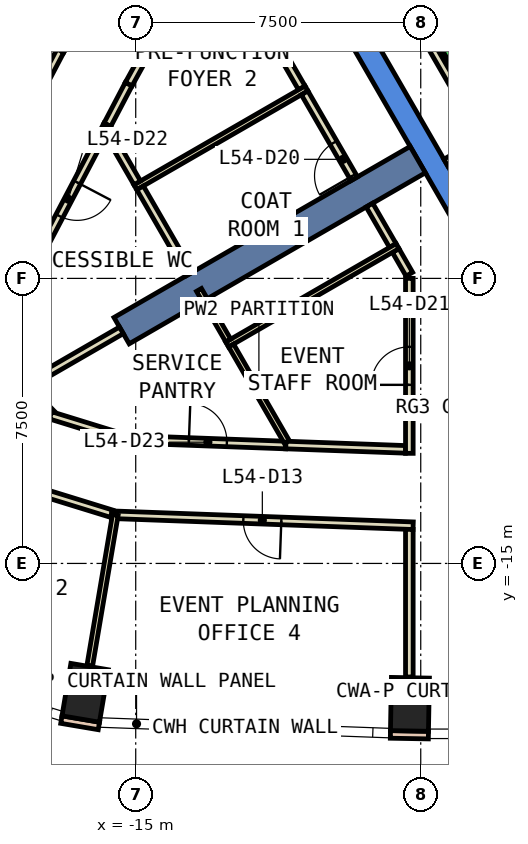
"""IFC4 building model, lengths in metres.
Left out: names, types, materials, properties, quantities, classifications, styles, units other than length and angle.
Written with IfcOpenShell. Run it as: python <this file> out.ifc"""

import sys

from ifc_helpers import new_model, si_unit, direction, frame, frame_2d, origin, origin_2d, place, context, subcontext, project, spatial, polyline, rectangle, outline, extrude, element, fill, save


model = new_model("IFC4")
c1 = context("Model", 3, precision=1e-05, world=origin(), true_north=direction((0.0, 1.0)))
c2 = subcontext(c1, "Body", "Model", "MODEL_VIEW")
j1 = project(units=[si_unit("LENGTHUNIT", "METRE"), si_unit("PLANEANGLEUNIT", "RADIAN")], contexts=[c1])
p1 = place(None, origin())
s1 = spatial("IfcSite", under=j1, at=p1, CompositionType="ELEMENT")
p2 = place(p1, origin())
s2 = spatial("IfcBuilding", under=s1, at=p2, CompositionType="ELEMENT")
p3 = place(p2, frame((0.0, 0.0, 241.4)))
s3 = spatial("IfcBuildingStorey", under=s2, at=p3, CompositionType="ELEMENT", Elevation=241.4)
for number, where, z_axis, x_axis in (
    (1, (-16.33, -18.404, 0.0), (0.0, 0.0, 1.0), (-0.986, 0.167, 0.0)),
    (2, (-7.784, -18.708, 0.0), (0.0, 0.0, 1.0), (-1.0, 0.018, 0.0)),
):
    element("IfcColumn", number, at=place(p3, frame(where, z_axis=z_axis, x_axis=x_axis)), inside=s3, PredefinedType="COLUMN", context=c2, shape_type="SweptSolid", body=[
        extrude(rectangle(XDim=1.0, YDim=1.4, at=origin_2d()), origin(), (0.0, 0.0, 1.0), 3.26),
    ])
p4 = place(p3, frame((0.0, 0.0, -0.6)))
e3 = element("IfcWall", 3, at=p4, inside=s3, PredefinedType="SHEAR", context=c2, shape_type="SweptSolid", body=[
    extrude(outline(polyline([(-11.547, 2.5), (-5.774, -7.5), (-5.427, -6.9), (-10.854, 2.5), (-11.547, 2.5)])), origin(), (0.0, 0.0, 1.0), 3.86),
])
p5 = place(p3, frame((-7.578, -4.375, -0.6), z_axis=(0.0, 0.0, 1.0), x_axis=(-0.866024315419, -0.5000018851, 0.0)))
e4 = element("IfcWall", 4, at=p5, inside=s3, PredefinedType="SHEAR", context=c2, shape_type="SweptSolid", body=[
    extrude(rectangle(XDim=9.0, YDim=0.8, at=frame_2d((4.5, 0.0))), origin(), (0.0, 0.0, 1.0), 3.86),
])
for number, where, z_axis, x_axis in (
    (5, (-16.956, -19.109, 0.0), (0.0, 0.0, 1.0), (0.986, -0.167, 0.0)),
    (6, (-8.298, -19.499, 0.0), (0.0, 0.0, 1.0), (1.0, -0.018, 0.0)),
):
    element("IfcWall", number, at=place(p3, frame(where, z_axis=z_axis, x_axis=x_axis)), inside=s3, PredefinedType="STANDARD", context=c2, shape_type="SweptSolid", body=[
        extrude(rectangle(XDim=1.0, YDim=0.2, at=frame_2d((0.5, 0.0))), origin(), (0.0, 0.0, 1.0), 3.26),
    ])
p6 = place(p3, frame((-10.63, -2.488, 0.0), z_axis=(0.0, 0.0, 1.0), x_axis=(-0.500108649621, 0.865962665808, 0.0)))
e7 = element("IfcWall", 7, at=p6, inside=s3, PredefinedType="PARTITIONING", context=c2, shape_type="SweptSolid", body=[
    extrude(rectangle(XDim=4.815, YDim=0.2, at=frame_2d((2.408, 0.0))), origin(), (0.0, 0.0, 1.0), 3.26),
])
p7 = place(p6, frame((1.908, 0.0, 0.0)))
e8 = element("IfcOpeningElement", 8, at=p7, cuts=e7, PredefinedType="OPENING", context=c2, shape_type="SweptSolid", body=[
    extrude(rectangle(XDim=1.0, YDim=2.1, at=frame_2d((0.5, 1.05))), frame((0.0, 0.11, 0.0), z_axis=(0.0, -1.0, 0.0), x_axis=(1.0, 0.0, 0.0)), (0.0, 0.0, 1.0), 0.22),
])
p8 = place(p3, frame((-13.036, 1.508, 0.0), z_axis=(0.0, 0.0, 1.0), x_axis=(-0.482884552822, -0.87568402329, 0.0)))
e9 = element("IfcWall", 9, at=p8, inside=s3, PredefinedType="PARTITIONING", context=c2, shape_type="SweptSolid", body=[
    extrude(rectangle(XDim=4.453, YDim=0.2, at=frame_2d((2.226, 0.0))), origin(), (0.0, 0.0, 1.0), 3.26),
])
p9 = place(p3, frame((-15.186, -2.391, 0.0), z_axis=(0.0, 0.0, 1.0), x_axis=(-0.464794189951, -0.885418748948, 0.0)))
e10 = element("IfcWall", 10, at=p9, inside=s3, PredefinedType="PARTITIONING", context=c2, shape_type="SweptSolid", body=[
    extrude(rectangle(XDim=1.205, YDim=0.2, at=frame_2d((0.603, 0.0))), origin(), (0.0, 0.0, 1.0), 3.26),
])
p10 = place(p3, frame((-8.235, -6.636, 0.0), z_axis=(0.0, 0.0, 1.0), x_axis=(-0.500089055364, 0.86597398154, 0.0)))
e11 = element("IfcWall", 11, at=p10, inside=s3, PredefinedType="PARTITIONING", context=c2, shape_type="SweptSolid", body=[
    extrude(rectangle(XDim=1.23, YDim=0.2, at=frame_2d((0.615, 0.0))), origin(), (0.0, 0.0, 1.0), 3.26),
])
p11 = place(p3, frame((-7.8, -7.39, 0.0), z_axis=(0.0, 0.0, 1.0), x_axis=(-0.499712670472, 0.866191230024, 0.0)))
e12 = element("IfcWall", 12, at=p11, inside=s3, PredefinedType="PARTITIONING", context=c2, shape_type="SweptSolid", body=[
    extrude(rectangle(XDim=0.72, YDim=0.2, at=frame_2d((0.36, 0.0))), origin(), (0.0, 0.0, 1.0), 3.26),
])
p12 = place(p3, frame((-11.052, -11.884, 0.0), z_axis=(0.0, 0.0, 1.0), x_axis=(0.999335249241, -0.036456270033, 0.0)))
e13 = element("IfcWall", 13, at=p12, inside=s3, PredefinedType="PARTITIONING", context=c2, shape_type="SweptSolid", body=[
    extrude(rectangle(XDim=3.154, YDim=0.2, at=frame_2d((1.577, 0.0))), origin(), (0.0, 0.0, 1.0), 3.26),
])
p13 = place(p3, frame((-15.746, -3.458, 0.0), z_axis=(0.0, 0.0, 1.0), x_axis=(-0.465179971699, -0.885216128372, 0.0)))
e14 = element("IfcWall", 14, at=p13, inside=s3, PredefinedType="PARTITIONING", context=c2, shape_type="SweptSolid", body=[
    extrude(rectangle(XDim=4.424, YDim=0.2, at=frame_2d((2.212, 0.0))), origin(), (0.0, 0.0, 1.0), 3.26),
])
p14 = place(p13, frame((1.712, 0.0, 0.0)))
e15 = element("IfcOpeningElement", 15, at=p14, cuts=e14, PredefinedType="OPENING", context=c2, shape_type="SweptSolid", body=[
    extrude(rectangle(XDim=1.0, YDim=2.1, at=frame_2d((0.5, 1.05))), frame((0.0, 0.11, 0.0), z_axis=(0.0, -1.0, 0.0), x_axis=(1.0, 0.0, 0.0)), (0.0, 0.0, 1.0), 0.22),
])
p15 = place(p3, frame((-17.915, -10.344, 0.0), z_axis=(0.0, 0.0, 1.0), x_axis=(0.698527813511, -0.715582904877, 0.0)))
e16 = element("IfcWall", 16, at=p15, inside=s3, PredefinedType="PARTITIONING", context=c2, shape_type="SweptSolid", body=[
    extrude(rectangle(XDim=1.002, YDim=0.2, at=frame_2d((0.501, 0.0))), origin(), (0.0, 0.0, 1.0), 3.26),
])
p16 = place(p3, frame((-17.241, -11.103, 0.0), z_axis=(0.0, 0.0, 1.0), x_axis=(0.95563113363, -0.294566013716, 0.0)))
e17 = element("IfcWall", 17, at=p16, inside=s3, PredefinedType="PARTITIONING", context=c2, shape_type="SweptSolid", body=[
    extrude(rectangle(XDim=2.036, YDim=0.2, at=frame_2d((1.018, 0.0))), origin(), (0.0, 0.0, 1.0), 3.26),
])
p17 = place(p3, frame((-15.3, -11.729, 0.0), z_axis=(0.0, 0.0, 1.0), x_axis=(0.999326350165, -0.036699398722, 0.0)))
e18 = element("IfcWall", 18, at=p17, inside=s3, PredefinedType="PARTITIONING", context=c2, shape_type="SweptSolid", body=[
    extrude(rectangle(XDim=4.251, YDim=0.2, at=frame_2d((2.125, 0.0))), origin(), (0.0, 0.0, 1.0), 3.26),
])
p18 = place(p17, frame((1.7, 0.0, 0.0)))
e19 = element("IfcOpeningElement", 19, at=p18, cuts=e18, PredefinedType="OPENING", context=c2, shape_type="SweptSolid", body=[
    extrude(rectangle(XDim=1.0, YDim=2.1, at=frame_2d((0.5, 1.05))), frame((0.0, 0.11, 0.0), z_axis=(0.0, -1.0, 0.0), x_axis=(1.0, 0.0, 0.0)), (0.0, 0.0, 1.0), 0.22),
])
p19 = place(p3, frame((-16.983, -1.509, 0.0), z_axis=(0.0, 0.0, 1.0), x_axis=(0.482785999899, 0.875738361785, 0.0)))
e20 = element("IfcWall", 20, at=p19, inside=s3, PredefinedType="PARTITIONING", context=c2, shape_type="SweptSolid", body=[
    extrude(rectangle(XDim=6.558, YDim=0.2, at=frame_2d((3.279, 0.0))), origin(), (0.0, 0.0, 1.0), 3.26),
])
p20 = place(p19, frame((2.779, 0.0, 0.0)))
e21 = element("IfcOpeningElement", 21, at=p20, cuts=e20, PredefinedType="OPENING", context=c2, shape_type="SweptSolid", body=[
    extrude(rectangle(XDim=1.0, YDim=2.1, at=frame_2d((0.5, 1.05))), frame((0.0, 0.11, 0.0), z_axis=(0.0, -1.0, 0.0), x_axis=(1.0, 0.0, 0.0)), (0.0, 0.0, 1.0), 0.22),
])
p21 = place(p3, frame((-19.696, -6.675, 0.0), z_axis=(0.0, 0.0, 1.0), x_axis=(0.465165163774, 0.88522390976, 0.0)))
e22 = element("IfcWall", 22, at=p21, inside=s3, PredefinedType="PARTITIONING", context=c2, shape_type="SweptSolid", body=[
    extrude(rectangle(XDim=5.835, YDim=0.2, at=frame_2d((2.917, 0.0))), origin(), (0.0, 0.0, 1.0), 3.26),
])
p22 = place(p21, frame((2.492, 0.0, 0.0)))
e23 = element("IfcOpeningElement", 23, at=p22, cuts=e22, PredefinedType="OPENING", context=c2, shape_type="SweptSolid", body=[
    extrude(rectangle(XDim=1.0, YDim=2.1, at=frame_2d((0.5, 1.05))), frame((0.0, 0.11, 0.0), z_axis=(0.0, -1.0, 0.0), x_axis=(1.0, 0.0, 0.0)), (0.0, 0.0, 1.0), 0.22),
])
p23 = place(p3, frame((-15.632, -13.692, 0.0), z_axis=(0.0, 0.0, 1.0), x_axis=(-0.955600342663, 0.294665887239, 0.0)))
e24 = element("IfcWall", 24, at=p23, inside=s3, PredefinedType="PARTITIONING", context=c2, shape_type="SweptSolid", body=[
    extrude(rectangle(XDim=2.81, YDim=0.2, at=frame_2d((1.405, 0.0))), origin(), (0.0, 0.0, 1.0), 3.26),
])
p24 = place(p3, frame((-7.7, -14.008, 0.0), z_axis=(0.0, 0.0, 1.0), x_axis=(-0.99933282306, 0.036522715615, 0.0)))
e25 = element("IfcWall", 25, at=p24, inside=s3, PredefinedType="PARTITIONING", context=c2, shape_type="SweptSolid", body=[
    extrude(rectangle(XDim=7.941, YDim=0.2, at=frame_2d((3.971, 0.0))), origin(), (0.0, 0.0, 1.0), 3.26),
])
p25 = place(p24, frame((3.471, 0.0, 0.0)))
e26 = element("IfcOpeningElement", 26, at=p25, cuts=e25, PredefinedType="OPENING", context=c2, shape_type="SweptSolid", body=[
    extrude(rectangle(XDim=1.0, YDim=2.1, at=frame_2d((0.5, 1.05))), frame((0.0, 0.11, 0.0), z_axis=(0.0, -1.0, 0.0), x_axis=(1.0, 0.0, 0.0)), (0.0, 0.0, 1.0), 0.22),
])
p26 = place(p3, frame((-5.888, -3.902, 0.0), z_axis=(0.0, 0.0, 1.0), x_axis=(-0.86621513555, -0.499671230855, 0.0)))
e27 = element("IfcWall", 27, at=p26, inside=s3, PredefinedType="PARTITIONING", context=c2, shape_type="SweptSolid", body=[
    extrude(rectangle(XDim=1.1, YDim=0.2, at=frame_2d((0.55, 0.0))), origin(), (0.0, 0.0, 1.0), 3.26),
])
p27 = place(p3, frame((-9.751, 2.99, 0.0), z_axis=(0.0, 0.0, 1.0), x_axis=(0.500012163284, -0.866018381195, 0.0)))
e28 = element("IfcWall", 28, at=p27, inside=s3, PredefinedType="PARTITIONING", context=c2, shape_type="SweptSolid", body=[
    extrude(rectangle(XDim=8.0, YDim=0.2, at=frame_2d((4.0, 0.0))), origin(), (0.0, 0.0, 1.0), 3.26),
])
p28 = place(p3, frame((-7.8, -12.103, 0.0), z_axis=(0.0, 0.0, 1.0), x_axis=(0.0, 1.0, 0.0)))
e29 = element("IfcWall", 29, at=p28, inside=s3, PredefinedType="PARTITIONING", context=c2, shape_type="SweptSolid", body=[
    extrude(rectangle(XDim=4.604, YDim=0.2, at=frame_2d((2.302, 0.0))), origin(), (0.0, 0.0, 1.0), 3.26),
])
p29 = place(p28, frame((1.802, 0.0, 0.0)))
e30 = element("IfcOpeningElement", 30, at=p29, cuts=e29, PredefinedType="OPENING", context=c2, shape_type="SweptSolid", body=[
    extrude(rectangle(XDim=1.0, YDim=2.1, at=frame_2d((0.5, 1.05))), frame((0.0, 0.11, 0.0), z_axis=(0.0, -1.0, 0.0), x_axis=(1.0, 0.0, 0.0)), (0.0, 0.0, 1.0), 0.22),
])
p30 = place(p3, frame((-7.8, -17.988, 0.0), z_axis=(0.0, 0.0, 1.0), x_axis=(0.0, 1.0, 0.0)))
e31 = element("IfcWall", 31, at=p30, inside=s3, PredefinedType="PARTITIONING", context=c2, shape_type="SweptSolid", body=[
    extrude(rectangle(XDim=3.884, YDim=0.2, at=frame_2d((1.942, 0.0))), origin(), (0.0, 0.0, 1.0), 3.26),
])
p31 = place(p3, frame((-10.506, -2.503, 0.0), z_axis=(0.0, 0.0, 1.0), x_axis=(-0.866044872465, -0.49996627774, 0.0)))
e32 = element("IfcWall", 32, at=p31, inside=s3, PredefinedType="PARTITIONING", context=c2, shape_type="SweptSolid", body=[
    extrude(rectangle(XDim=5.2, YDim=0.15, at=frame_2d((2.6, 0.0))), origin(), (0.0, 0.0, 1.0), 3.26),
])
p32 = place(p3, frame((-14.96, -4.988, 0.0), z_axis=(0.0, 0.0, 1.0), x_axis=(-0.500175017317, 0.865924333907, 0.0)))
e33 = element("IfcWall", 33, at=p32, inside=s3, PredefinedType="PARTITIONING", context=c2, shape_type="SweptSolid", body=[
    extrude(rectangle(XDim=1.666, YDim=0.2, at=frame_2d((0.833, 0.0))), origin(), (0.0, 0.0, 1.0), 3.26),
])
p33 = place(p3, frame((-8.111, -6.651, 0.0), z_axis=(0.0, 0.0, 1.0), x_axis=(-0.865984471925, -0.50007088936, 0.0)))
e34 = element("IfcWall", 34, at=p33, inside=s3, PredefinedType="PARTITIONING", context=c2, shape_type="SweptSolid", body=[
    extrude(rectangle(XDim=5.176, YDim=0.15, at=frame_2d((2.588, 0.0))), origin(), (0.0, 0.0, 1.0), 3.26),
])
p34 = place(p3, frame((-13.58, -7.379, 0.0), z_axis=(0.0, 0.0, 1.0), x_axis=(-0.499870876044, 0.866099940701, 0.0)))
e35 = element("IfcWall", 35, at=p34, inside=s3, PredefinedType="PARTITIONING", context=c2, shape_type="SweptSolid", body=[
    extrude(rectangle(XDim=2.611, YDim=0.2, at=frame_2d((1.305, 0.0))), origin(), (0.0, 0.0, 1.0), 3.26),
])
p35 = place(p3, frame((-12.565, -9.136, 0.0), z_axis=(0.0, 0.0, 1.0), x_axis=(-0.500198329269, 0.865910868044, 0.0)))
e36 = element("IfcWall", 36, at=p35, inside=s3, PredefinedType="PARTITIONING", context=c2, shape_type="SweptSolid", body=[
    extrude(rectangle(XDim=1.539, YDim=0.15, at=frame_2d((0.77, 0.0))), origin(), (0.0, 0.0, 1.0), 3.26),
])
p36 = place(p3, frame((-11.027, -11.8, 0.0), z_axis=(0.0, 0.0, 1.0), x_axis=(-0.499980071345, 0.866036909293, 0.0)))
e37 = element("IfcWall", 37, at=p36, inside=s3, PredefinedType="PARTITIONING", context=c2, shape_type="SweptSolid", body=[
    extrude(rectangle(XDim=2.926, YDim=0.15, at=frame_2d((1.463, 0.0))), origin(), (0.0, 0.0, 1.0), 3.26),
])
p37 = place(p3, frame((-15.377, -8.867, 0.0), z_axis=(0.0, 0.0, 1.0), x_axis=(-0.865965767548, -0.500103278768, 0.0)))
e38 = element("IfcWall", 38, at=p37, inside=s3, PredefinedType="PARTITIONING", context=c2, shape_type="SweptSolid", body=[
    extrude(rectangle(XDim=3.033, YDim=0.2, at=frame_2d((1.517, 0.0))), origin(), (0.0, 0.0, 1.0), 3.26),
])
p38 = place(p3, frame((-15.537, -13.722, 0.0), z_axis=(0.0, 0.0, 1.0), x_axis=(-0.167012380144, -0.985954798598, 0.0)))
e39 = element("IfcWall", 39, at=p38, inside=s3, PredefinedType="PARTITIONING", context=c2, shape_type="SweptSolid", body=[
    extrude(rectangle(XDim=4.029, YDim=0.15, at=frame_2d((2.014, 0.0))), origin(), (0.0, 0.0, 1.0), 3.26),
])
p39 = place(p3, frame((-9.25, -4.878, 0.0), z_axis=(0.0, 0.0, 1.0), x_axis=(-0.500032875382, 0.866006422342, 0.0)))
e40 = element("IfcWall", 40, at=p39, inside=s3, PredefinedType="PARTITIONING", context=c2, shape_type="SweptSolid", body=[
    extrude(rectangle(XDim=2.61, YDim=0.2, at=frame_2d((1.305, 0.0))), origin(), (0.0, 0.0, 1.0), 3.26),
])
p40 = place(p39, frame((0.09, 0.0, 0.0)))
e41 = element("IfcOpeningElement", 41, at=p40, cuts=e40, PredefinedType="OPENING", context=c2, shape_type="SweptSolid", body=[
    extrude(rectangle(XDim=1.0, YDim=2.1, at=frame_2d((0.5, 1.05))), frame((0.0, 0.11, 0.0), z_axis=(0.0, -1.0, 0.0), x_axis=(1.0, 0.0, 0.0)), (0.0, 0.0, 1.0), 0.22),
])
p41 = place(p3, frame((-8.192, 0.888, 0.0), z_axis=(0.0, 0.0, 1.0), x_axis=(0.500034260056, -0.866005622828, 0.0)))
e42 = element("IfcWall", 42, at=p41, inside=s3, PredefinedType="STANDARD", context=c2, shape_type="SweptSolid", body=[
    extrude(rectangle(XDim=5.399, YDim=0.2, at=frame_2d((2.7, 0.0))), origin(), (0.0, 0.0, 1.0), 3.26),
])
p42 = place(p25, origin())
e43 = element("IfcDoor", 43, at=p42, inside=s3, OperationType="SINGLE_SWING_RIGHT", PredefinedType="DOOR", context=c2, shape_type="SweptSolid", body=[
    extrude(rectangle(XDim=1.0, YDim=2.1, at=frame_2d((0.5, 1.05))), frame((0.0, 0.025, 0.0), z_axis=(0.0, -1.0, 0.0), x_axis=(1.0, 0.0, 0.0)), (0.0, 0.0, 1.0), 0.05),
])
fill(e26, e43)
p43 = place(p40, origin())
e44 = element("IfcDoor", 44, at=p43, inside=s3, OperationType="SINGLE_SWING_LEFT", PredefinedType="DOOR", context=c2, shape_type="SweptSolid", body=[
    extrude(rectangle(XDim=1.0, YDim=2.1, at=frame_2d((0.5, 1.05))), frame((0.0, 0.025, 0.0), z_axis=(0.0, -1.0, 0.0), x_axis=(1.0, 0.0, 0.0)), (0.0, 0.0, 1.0), 0.05),
])
fill(e41, e44)
p44 = place(p29, origin())
e45 = element("IfcDoor", 45, at=p44, inside=s3, OperationType="SINGLE_SWING_LEFT", PredefinedType="DOOR", context=c2, shape_type="SweptSolid", body=[
    extrude(rectangle(XDim=1.0, YDim=2.1, at=frame_2d((0.5, 1.05))), frame((0.0, 0.025, 0.0), z_axis=(0.0, -1.0, 0.0), x_axis=(1.0, 0.0, 0.0)), (0.0, 0.0, 1.0), 0.05),
])
fill(e30, e45)
p45 = place(p14, origin())
e46 = element("IfcDoor", 46, at=p45, inside=s3, OperationType="SINGLE_SWING_LEFT", PredefinedType="DOOR", context=c2, shape_type="SweptSolid", body=[
    extrude(rectangle(XDim=1.0, YDim=2.1, at=frame_2d((0.5, 1.05))), frame((0.0, 0.025, 0.0), z_axis=(0.0, -1.0, 0.0), x_axis=(1.0, 0.0, 0.0)), (0.0, 0.0, 1.0), 0.05),
])
fill(e15, e46)
p46 = place(p18, origin())
e47 = element("IfcDoor", 47, at=p46, inside=s3, OperationType="SINGLE_SWING_LEFT", PredefinedType="DOOR", context=c2, shape_type="SweptSolid", body=[
    extrude(rectangle(XDim=1.0, YDim=2.1, at=frame_2d((0.5, 1.05))), frame((0.0, 0.025, 0.0), z_axis=(0.0, -1.0, 0.0), x_axis=(1.0, 0.0, 0.0)), (0.0, 0.0, 1.0), 0.05),
])
fill(e19, e47)
save(model, sys.argv[1])
